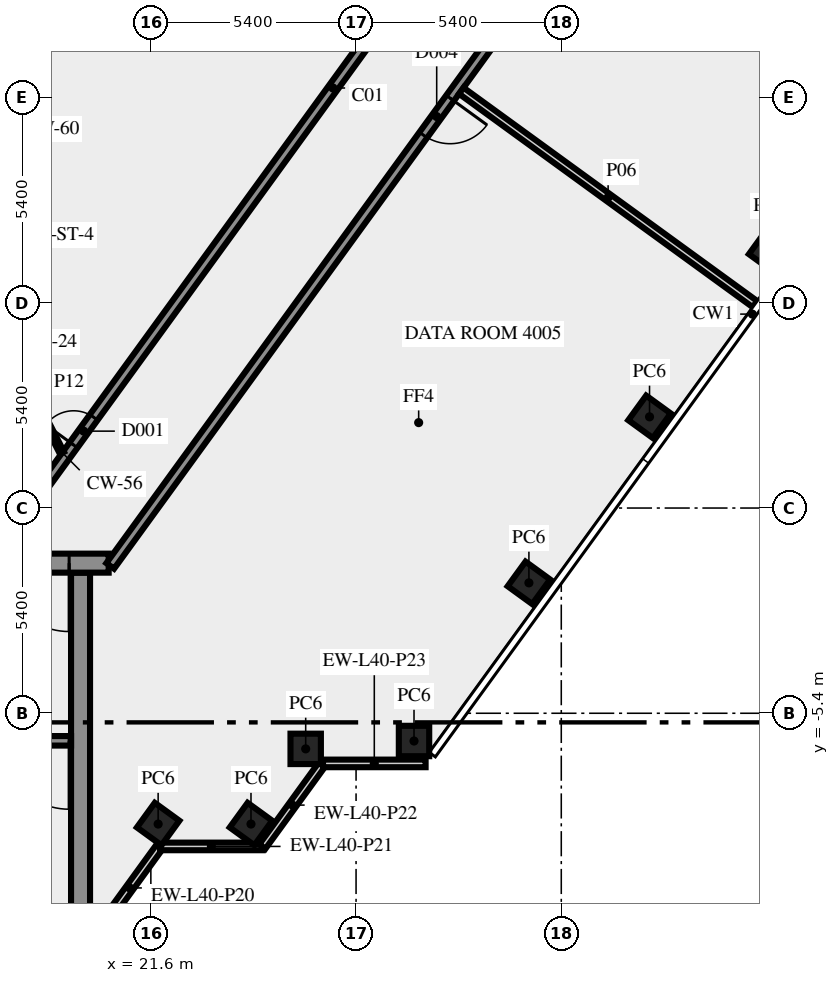
"""IFC4 building model, lengths in metres.
Left out: names, types, materials, properties, quantities, classifications, styles, units other than length and angle.
Written with IfcOpenShell. Run it as: python <this file> out.ifc"""

import sys

from ifc_helpers import new_model, si_unit, direction, frame, frame_2d, origin, origin_2d, place, context, subcontext, project, spatial, rectangle, extrude, element, fill, save


model = new_model("IFC4")
c1 = context("Model", 3, precision=1e-05, world=origin(), true_north=direction((0.0, 1.0)))
c2 = subcontext(c1, "Body", "Model", "MODEL_VIEW")
j1 = project(units=[si_unit("LENGTHUNIT", "METRE"), si_unit("PLANEANGLEUNIT", "RADIAN")], contexts=[c1])
p1 = place(None, origin())
s1 = spatial("IfcSite", under=j1, at=p1, CompositionType="ELEMENT")
p2 = place(p1, origin())
s2 = spatial("IfcBuilding", under=s1, at=p2, CompositionType="ELEMENT")
p3 = place(p2, frame((0.0, 0.0, 172.0)))
s3 = spatial("IfcBuildingStorey", under=s2, at=p3, CompositionType="ELEMENT", Elevation=172.0)
for number, where, z_axis, x_axis in (
    (1, (21.792, -8.315, 0.0), (0.0, 0.0, 1.0), (0.588, 0.809, 0.0)),
    (2, (24.235, -8.315, 0.0), (0.0, 0.0, 1.0), (0.588, 0.809, 0.0)),
    (3, (25.674, -6.337, 0.0), (0.0, 0.0, 1.0), (1.0, 0.0, 0.0)),
    (4, (28.525, -6.13, 0.0), (0.0, 0.0, 1.0), (1.0, 0.0, 0.0)),
    (5, (31.548, -1.969, 0.0), (0.0, 0.0, 1.0), (0.588, 0.809, 0.0)),
    (6, (34.722, 2.4, 0.0), (0.0, 0.0, 1.0), (0.588, 0.809, 0.0)),
    (7, (37.896, 6.769, 0.0), (0.0, 0.0, 1.0), (0.588, 0.809, 0.0)),
):
    element("IfcColumn", number, at=place(p3, frame(where, z_axis=z_axis, x_axis=x_axis)), inside=s3, PredefinedType="COLUMN", context=c2, shape_type="SweptSolid", body=[
        extrude(rectangle(XDim=0.8, YDim=0.8, at=origin_2d()), origin(), (0.0, 0.0, 1.0), 3.65),
    ])
p4 = place(p3, frame((20.253, -11.083, 0.0), z_axis=(0.0, 0.0, 1.0), x_axis=(0.587766567315, 0.809030569476, 0.0)))
e8 = element("IfcWall", 8, at=p4, inside=s3, PredefinedType="SOLIDWALL", context=c2, shape_type="SweptSolid", body=[
    extrude(rectangle(XDim=2.688, YDim=0.2, at=frame_2d((1.344, 0.0))), origin(), (0.0, 0.0, 1.0), 3.65),
])
p5 = place(p3, frame((21.843, -8.904, 0.0), z_axis=(0.0, 0.0, 1.0), x_axis=(1.0, 0.0, 0.0)))
e9 = element("IfcWall", 9, at=p5, inside=s3, PredefinedType="SOLIDWALL", context=c2, shape_type="SweptSolid", body=[
    extrude(rectangle(XDim=2.7, YDim=0.2, at=frame_2d((1.35, 0.0))), origin(), (0.0, 0.0, 1.0), 3.65),
])
p6 = place(p3, frame((24.533, -8.909, 0.0), z_axis=(0.0, 0.0, 1.0), x_axis=(0.587720002413, 0.809064397168, 0.0)))
e10 = element("IfcWall", 10, at=p6, inside=s3, PredefinedType="SOLIDWALL", context=c2, shape_type="SweptSolid", body=[
    extrude(rectangle(XDim=2.7, YDim=0.2, at=frame_2d((1.35, 0.0))), origin(), (0.0, 0.0, 1.0), 3.65),
])
p7 = place(p3, frame((26.13, -6.719, 0.0), z_axis=(0.0, 0.0, 1.0), x_axis=(1.0, 0.0, 0.0)))
e11 = element("IfcWall", 11, at=p7, inside=s3, PredefinedType="SOLIDWALL", context=c2, shape_type="SweptSolid", body=[
    extrude(rectangle(XDim=2.7, YDim=0.2, at=frame_2d((1.35, 0.0))), origin(), (0.0, 0.0, 1.0), 3.65),
])
p8 = place(p3, frame((19.75, -10.5, 0.0), z_axis=(0.0, 0.0, 1.0), x_axis=(0.0, 1.0, 0.0)))
e12 = element("IfcWall", 12, at=p8, inside=s3, PredefinedType="SHEAR", context=c2, shape_type="SweptSolid", body=[
    extrude(rectangle(XDim=8.8, YDim=0.5, at=frame_2d((4.4, 0.0))), origin(), (0.0, 0.0, 1.0), 3.65),
])
p9 = place(p3, frame((19.5, -6.125, 0.0), z_axis=(0.0, 0.0, 1.0), x_axis=(-1.0, 0.0, 0.0)))
e13 = element("IfcWall", 13, at=p9, inside=s3, PredefinedType="SHEAR", context=c2, shape_type="SweptSolid", body=[
    extrude(rectangle(XDim=8.05, YDim=0.25, at=frame_2d((4.025, 0.0))), origin(), (0.0, 0.0, 1.0), 3.65),
])
p10 = place(p9, frame((0.05, 0.0, 0.0)))
e14 = element("IfcOpeningElement", 14, at=p10, cuts=e13, PredefinedType="OPENING", context=c2, shape_type="SweptSolid", body=[
    extrude(rectangle(XDim=1.8, YDim=2.1, at=frame_2d((0.9, 1.05))), frame((0.0, 0.135, 0.0), z_axis=(0.0, -1.0, 0.0), x_axis=(1.0, 0.0, 0.0)), (0.0, 0.0, 1.0), 0.27),
])
p11 = place(p3, frame((20.49, -1.45, 0.0), z_axis=(0.0, 0.0, 1.0), x_axis=(-1.0, 0.0, 0.0)))
e15 = element("IfcWall", 15, at=p11, inside=s3, PredefinedType="SHEAR", context=c2, shape_type="SweptSolid", body=[
    extrude(rectangle(XDim=40.98, YDim=0.5, at=frame_2d((20.49, 0.0))), origin(), (0.0, 0.0, 1.0), 3.65),
])
p12 = place(p11, frame((38.14, 0.0, 0.0)))
e16 = element("IfcOpeningElement", 16, at=p12, cuts=e15, PredefinedType="OPENING", context=c2, shape_type="SweptSolid", body=[
    extrude(rectangle(XDim=1.8, YDim=2.1, at=frame_2d((0.9, 1.05))), frame((0.0, 0.26, 0.0), z_axis=(0.0, -1.0, 0.0), x_axis=(1.0, 0.0, 0.0)), (0.0, 0.0, 1.0), 0.52),
])
p13 = place(p11, frame((36.728, 0.0, 0.0)))
e17 = element("IfcOpeningElement", 17, at=p13, cuts=e15, PredefinedType="OPENING", context=c2, shape_type="SweptSolid", body=[
    extrude(rectangle(XDim=0.8, YDim=2.1, at=frame_2d((0.4, 1.05))), frame((0.0, 0.26, 0.0), z_axis=(0.0, -1.0, 0.0), x_axis=(1.0, 0.0, 0.0)), (0.0, 0.0, 1.0), 0.52),
])
p14 = place(p11, frame((35.153, 0.0, 0.0)))
e18 = element("IfcOpeningElement", 18, at=p14, cuts=e15, PredefinedType="OPENING", context=c2, shape_type="SweptSolid", body=[
    extrude(rectangle(XDim=0.8, YDim=2.1, at=frame_2d((0.4, 1.05))), frame((0.0, 0.26, 0.0), z_axis=(0.0, -1.0, 0.0), x_axis=(1.0, 0.0, 0.0)), (0.0, 0.0, 1.0), 0.52),
])
p15 = place(p11, frame((32.94, 0.0, 0.0)))
e19 = element("IfcOpeningElement", 19, at=p15, cuts=e15, PredefinedType="OPENING", context=c2, shape_type="SweptSolid", body=[
    extrude(rectangle(XDim=0.9, YDim=2.1, at=frame_2d((0.45, 1.05))), frame((0.0, 0.26, 0.0), z_axis=(0.0, -1.0, 0.0), x_axis=(1.0, 0.0, 0.0)), (0.0, 0.0, 1.0), 0.52),
])
p16 = place(p11, frame((27.84, 0.0, 0.0)))
e20 = element("IfcOpeningElement", 20, at=p16, cuts=e15, PredefinedType="OPENING", context=c2, shape_type="SweptSolid", body=[
    extrude(rectangle(XDim=0.9, YDim=2.1, at=frame_2d((0.45, 1.05))), frame((0.0, 0.26, 0.0), z_axis=(0.0, -1.0, 0.0), x_axis=(1.0, 0.0, 0.0)), (0.0, 0.0, 1.0), 0.52),
])
p17 = place(p11, frame((21.765, 0.0, 0.0)))
e21 = element("IfcOpeningElement", 21, at=p17, cuts=e15, PredefinedType="OPENING", context=c2, shape_type="SweptSolid", body=[
    extrude(rectangle(XDim=2.0, YDim=2.1, at=frame_2d((1.0, 1.05))), frame((0.0, 0.26, 0.0), z_axis=(0.0, -1.0, 0.0), x_axis=(1.0, 0.0, 0.0)), (0.0, 0.0, 1.0), 0.52),
])
p18 = place(p11, frame((7.14, 0.0, 0.0)))
e22 = element("IfcOpeningElement", 22, at=p18, cuts=e15, PredefinedType="OPENING", context=c2, shape_type="SweptSolid", body=[
    extrude(rectangle(XDim=0.9, YDim=2.1, at=frame_2d((0.45, 1.05))), frame((0.0, 0.26, 0.0), z_axis=(0.0, -1.0, 0.0), x_axis=(1.0, 0.0, 0.0)), (0.0, 0.0, 1.0), 0.52),
])
p19 = place(p11, frame((4.19, 0.0, 0.0)))
e23 = element("IfcOpeningElement", 23, at=p19, cuts=e15, PredefinedType="OPENING", context=c2, shape_type="SweptSolid", body=[
    extrude(rectangle(XDim=0.9, YDim=2.1, at=frame_2d((0.45, 1.05))), frame((0.0, 0.26, 0.0), z_axis=(0.0, -1.0, 0.0), x_axis=(1.0, 0.0, 0.0)), (0.0, 0.0, 1.0), 0.52),
])
p20 = place(p11, frame((1.04, 0.0, 0.0)))
e24 = element("IfcOpeningElement", 24, at=p20, cuts=e15, PredefinedType="OPENING", context=c2, shape_type="SweptSolid", body=[
    extrude(rectangle(XDim=1.8, YDim=2.1, at=frame_2d((0.9, 1.05))), frame((0.0, 0.26, 0.0), z_axis=(0.0, -1.0, 0.0), x_axis=(1.0, 0.0, 0.0)), (0.0, 0.0, 1.0), 0.52),
])
p21 = place(p3, frame((17.545, -1.125, 0.0), z_axis=(0.0, 0.0, 1.0), x_axis=(0.587786330937, 0.809016210693, 0.0)))
e25 = element("IfcWall", 25, at=p21, inside=s3, PredefinedType="SOLIDWALL", context=c2, shape_type="SweptSolid", body=[
    extrude(rectangle(XDim=30.103, YDim=0.25, at=frame_2d((15.052, 0.0))), origin(), (0.0, 0.0, 1.0), 3.65),
])
p22 = place(p21, frame((3.441, 0.0, 0.0)))
e26 = element("IfcOpeningElement", 26, at=p22, cuts=e25, PredefinedType="OPENING", context=c2, shape_type="SweptSolid", body=[
    extrude(rectangle(XDim=0.9, YDim=2.1, at=frame_2d((0.45, 1.05))), frame((0.0, 0.135, 0.0), z_axis=(0.0, -1.0, 0.0), x_axis=(1.0, 0.0, 0.0)), (0.0, 0.0, 1.0), 0.27),
])
p23 = place(p21, frame((23.158, 0.0, 0.0)))
e27 = element("IfcOpeningElement", 27, at=p23, cuts=e25, PredefinedType="OPENING", context=c2, shape_type="SweptSolid", body=[
    extrude(rectangle(XDim=0.9, YDim=2.1, at=frame_2d((0.45, 1.05))), frame((0.0, 0.135, 0.0), z_axis=(0.0, -1.0, 0.0), x_axis=(1.0, 0.0, 0.0)), (0.0, 0.0, 1.0), 0.27),
])
p24 = place(p21, frame((21.558, 0.0, 0.0)))
e28 = element("IfcOpeningElement", 28, at=p24, cuts=e25, PredefinedType="OPENING", context=c2, shape_type="SweptSolid", body=[
    extrude(rectangle(XDim=0.9, YDim=2.1, at=frame_2d((0.45, 1.05))), frame((0.0, 0.135, 0.0), z_axis=(0.0, -1.0, 0.0), x_axis=(1.0, 0.0, 0.0)), (0.0, 0.0, 1.0), 0.27),
])
p25 = place(p3, frame((37.236, 21.469, 0.0), z_axis=(0.0, 0.0, 1.0), x_axis=(-0.58778344073, -0.809018310549, 0.0)))
e29 = element("IfcWall", 29, at=p25, inside=s3, PredefinedType="SOLIDWALL", context=c2, shape_type="SweptSolid", body=[
    extrude(rectangle(XDim=28.42, YDim=0.25, at=frame_2d((14.21, 0.0))), origin(), (0.0, 0.0, 1.0), 3.65),
])
p26 = place(p25, frame((13.205, 0.0, 0.0)))
e30 = element("IfcOpeningElement", 30, at=p26, cuts=e29, PredefinedType="OPENING", context=c2, shape_type="SweptSolid", body=[
    extrude(rectangle(XDim=1.2, YDim=2.1, at=frame_2d((0.6, 1.05))), frame((0.0, 0.135, 0.0), z_axis=(0.0, -1.0, 0.0), x_axis=(1.0, 0.0, 0.0)), (0.0, 0.0, 1.0), 0.27),
])
p27 = place(p25, frame((0.224, 0.0, 0.0)))
e31 = element("IfcOpeningElement", 31, at=p27, cuts=e29, PredefinedType="OPENING", context=c2, shape_type="SweptSolid", body=[
    extrude(rectangle(XDim=0.9, YDim=2.1, at=frame_2d((0.45, 1.05))), frame((0.0, 0.135, 0.0), z_axis=(0.0, -1.0, 0.0), x_axis=(1.0, 0.0, 0.0)), (0.0, 0.0, 1.0), 0.27),
])
p28 = place(p3, frame((37.496, 5.367, 0.0), z_axis=(0.0, 0.0, 1.0), x_axis=(-0.809048817734, 0.587741448702, 0.0)))
e32 = element("IfcWall", 32, at=p28, inside=s3, PredefinedType="SOLIDWALL", context=c2, shape_type="SweptSolid", body=[
    extrude(rectangle(XDim=9.55, YDim=0.2, at=frame_2d((4.775, 0.0))), origin(), (0.0, 0.0, 1.0), 2.85),
])
p29 = place(p3, frame((18.0, 3.925, 0.0), z_axis=(0.0, 0.0, 1.0), x_axis=(0.453950796792, -0.891026752736, 0.0)))
e33 = element("IfcWall", 33, at=p29, inside=s3, PredefinedType="PARTITIONING", context=c2, shape_type="SweptSolid", body=[
    extrude(rectangle(XDim=2.778, YDim=0.12, at=frame_2d((1.389, 0.0))), origin(), (0.0, 0.0, 1.0), 3.65),
])
p30 = place(p10, origin())
e34 = element("IfcDoor", 34, at=p30, inside=s3, OperationType="DOUBLE_DOOR_SINGLE_SWING", PredefinedType="DOOR", context=c2, shape_type="SweptSolid", body=[
    extrude(rectangle(XDim=1.8, YDim=2.1, at=frame_2d((0.9, 1.05))), frame((0.0, 0.025, 0.0), z_axis=(0.0, -1.0, 0.0), x_axis=(1.0, 0.0, 0.0)), (0.0, 0.0, 1.0), 0.05),
])
fill(e14, e34)
p31 = place(p20, origin())
e35 = element("IfcDoor", 35, at=p31, inside=s3, OperationType="DOUBLE_DOOR_SINGLE_SWING", PredefinedType="DOOR", context=c2, shape_type="SweptSolid", body=[
    extrude(rectangle(XDim=1.8, YDim=2.1, at=frame_2d((0.9, 1.05))), frame((0.0, 0.025, 0.0), z_axis=(0.0, -1.0, 0.0), x_axis=(1.0, 0.0, 0.0)), (0.0, 0.0, 1.0), 0.05),
])
fill(e24, e35)
p32 = place(p26, origin())
e36 = element("IfcDoor", 36, at=p32, inside=s3, OperationType="SINGLE_SWING_LEFT", PredefinedType="DOOR", context=c2, shape_type="SweptSolid", body=[
    extrude(rectangle(XDim=1.2, YDim=2.1, at=frame_2d((0.6, 1.05))), frame((0.0, 0.025, 0.0), z_axis=(0.0, -1.0, 0.0), x_axis=(1.0, 0.0, 0.0)), (0.0, 0.0, 1.0), 0.05),
])
fill(e30, e36)
p33 = place(p22, origin())
e37 = element("IfcDoor", 37, at=p33, inside=s3, OperationType="SINGLE_SWING_LEFT", PredefinedType="DOOR", context=c2, shape_type="SweptSolid", body=[
    extrude(rectangle(XDim=0.9, YDim=2.1, at=frame_2d((0.45, 1.05))), frame((0.0, 0.025, 0.0), z_axis=(0.0, -1.0, 0.0), x_axis=(1.0, 0.0, 0.0)), (0.0, 0.0, 1.0), 0.05),
])
fill(e26, e37)
save(model, sys.argv[1])
